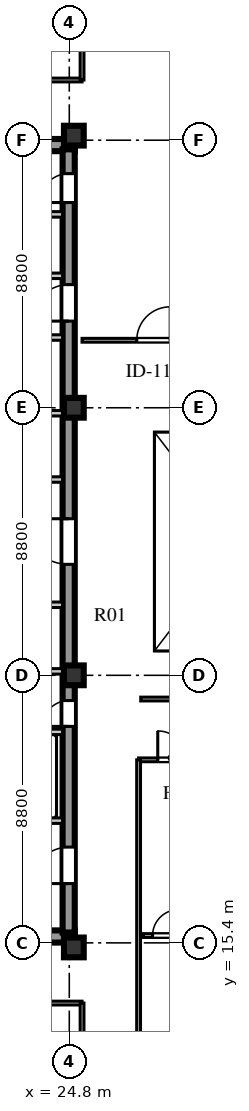
"""IFC4 building model, lengths in metres.
Left out: names, types, materials, properties, quantities, classifications, styles, units other than length and angle.
Written with IfcOpenShell. Run it as: python <this file> out.ifc"""

import sys

from ifc_helpers import new_model, si_unit, direction, frame, frame_2d, origin, origin_2d, place, context, subcontext, project, spatial, rectangle, extrude, element, fill, save


model = new_model("IFC4")
c1 = context("Model", 3, precision=1e-05, world=origin(), true_north=direction((0.0, 1.0)))
c2 = subcontext(c1, "Body", "Model", "MODEL_VIEW")
j1 = project(units=[si_unit("LENGTHUNIT", "METRE"), si_unit("PLANEANGLEUNIT", "RADIAN")], contexts=[c1])
p1 = place(None, origin())
s1 = spatial("IfcSite", under=j1, at=p1, CompositionType="ELEMENT")
p2 = place(p1, origin())
s2 = spatial("IfcBuilding", under=s1, at=p2, CompositionType="ELEMENT")
p3 = place(p2, frame((0.0, 0.0, 272.6)))
s3 = spatial("IfcBuildingStorey", under=s2, at=p3, CompositionType="ELEMENT", Elevation=272.6)
for number, where, z_axis, x_axis in (
    (1, (15.5, 15.61, 0.0), (0.0, 0.0, 1.0), (1.0, 0.0, 0.0)),
    (2, (15.5, 41.64, 0.0), (0.0, 0.0, 1.0), (1.0, 0.0, 0.0)),
):
    element("IfcWall", number, at=place(p3, frame(where, z_axis=z_axis, x_axis=x_axis)), inside=s3, PredefinedType="SHEAR", context=c2, shape_type="SweptSolid", body=[
        extrude(rectangle(XDim=9.48, YDim=0.4, at=frame_2d((4.74, 0.0))), origin(), (0.0, 0.0, 1.0), 3.66),
    ])
p4 = place(p3, frame((24.78, 15.74, 0.0), z_axis=(0.0, 0.0, 1.0), x_axis=(0.0, 1.0, 0.0)))
e3 = element("IfcWall", 3, at=p4, inside=s3, PredefinedType="SHEAR", context=c2, shape_type="SweptSolid", body=[
    extrude(rectangle(XDim=25.76, YDim=0.4, at=frame_2d((12.88, 0.0))), origin(), (0.0, 0.0, 1.0), 3.66),
])
p5 = place(p4, frame((1.61, 0.0, 0.0)))
e4 = element("IfcOpeningElement", 4, at=p5, cuts=e3, PredefinedType="OPENING", context=c2, shape_type="SweptSolid", body=[
    extrude(rectangle(XDim=1.2, YDim=2.1, at=frame_2d((0.6, 1.05))), frame((0.0, 0.21, 0.0), z_axis=(0.0, -1.0, 0.0), x_axis=(1.0, 0.0, 0.0)), (0.0, 0.0, 1.0), 0.42),
])
p6 = place(p4, frame((6.78, 0.0, 0.0)))
e5 = element("IfcOpeningElement", 5, at=p6, cuts=e3, PredefinedType="OPENING", context=c2, shape_type="SweptSolid", body=[
    extrude(rectangle(XDim=0.85, YDim=2.06, at=frame_2d((0.425, 1.03))), frame((0.0, 0.21, 0.0), z_axis=(0.0, -1.0, 0.0), x_axis=(1.0, 0.0, 0.0)), (0.0, 0.0, 1.0), 0.42),
])
p7 = place(p4, frame((12.11, 0.0, 0.0)))
e6 = element("IfcOpeningElement", 6, at=p7, cuts=e3, PredefinedType="OPENING", context=c2, shape_type="SweptSolid", body=[
    extrude(rectangle(XDim=1.5, YDim=2.12, at=frame_2d((0.75, 1.06))), frame((0.0, 0.21, 0.0), z_axis=(0.0, -1.0, 0.0), x_axis=(1.0, 0.0, 0.0)), (0.0, 0.0, 1.0), 0.42),
])
p8 = place(p4, frame((20.11, 0.0, 0.0)))
e7 = element("IfcOpeningElement", 7, at=p8, cuts=e3, PredefinedType="OPENING", context=c2, shape_type="SweptSolid", body=[
    extrude(rectangle(XDim=1.2, YDim=2.12, at=frame_2d((0.6, 1.06))), frame((0.0, 0.21, 0.0), z_axis=(0.0, -1.0, 0.0), x_axis=(1.0, 0.0, 0.0)), (0.0, 0.0, 1.0), 0.42),
])
p9 = place(p4, frame((24.01, 0.0, 0.0)))
e8 = element("IfcOpeningElement", 8, at=p9, cuts=e3, PredefinedType="OPENING", context=c2, shape_type="SweptSolid", body=[
    extrude(rectangle(XDim=0.95, YDim=2.1, at=frame_2d((0.475, 1.05))), frame((0.0, 0.21, 0.0), z_axis=(0.0, -1.0, 0.0), x_axis=(1.0, 0.0, 0.0)), (0.0, 0.0, 1.0), 0.42),
])
for number, where, z_axis, x_axis in (
    (9, (24.95, 15.25, 0.0), (0.0, 0.0, 1.0), (1.0, 0.0, 0.0)),
    (10, (24.95, 24.2, 0.0), (0.0, 0.0, 1.0), (1.0, 0.0, 0.0)),
    (11, (24.95, 33.0, 0.0), (0.0, 0.0, 1.0), (1.0, 0.0, 0.0)),
    (12, (24.95, 41.95, 0.0), (0.0, 0.0, 1.0), (1.0, 0.0, 0.0)),
):
    element("IfcColumn", number, at=place(p3, frame(where, z_axis=z_axis, x_axis=x_axis)), inside=s3, PredefinedType="COLUMN", context=c2, shape_type="SweptSolid", body=[
        extrude(rectangle(XDim=0.65, YDim=0.65, at=origin_2d()), origin(), (0.0, 0.0, 1.0), 3.66),
    ])
p10 = place(p3, frame((19.64, 19.42, 0.0), z_axis=(0.0, 0.0, 1.0), x_axis=(1.0, 0.0, 0.0)))
e13 = element("IfcWall", 13, at=p10, inside=s3, PredefinedType="SOLIDWALL", context=c2, shape_type="SweptSolid", body=[
    extrude(rectangle(XDim=4.94, YDim=0.18, at=frame_2d((2.47, 0.0))), origin(), (0.0, 0.0, 1.0), 3.66),
])
p11 = place(p10, frame((0.72, 0.0, 0.0)))
e14 = element("IfcOpeningElement", 14, at=p11, cuts=e13, PredefinedType="OPENING", context=c2, shape_type="SweptSolid", body=[
    extrude(rectangle(XDim=1.1, YDim=2.1, at=frame_2d((0.55, 1.05))), frame((0.0, 0.1, 0.0), z_axis=(0.0, -1.0, 0.0), x_axis=(1.0, 0.0, 0.0)), (0.0, 0.0, 1.0), 0.2),
])
p12 = place(p10, frame((3.02, 0.0, 0.0)))
e15 = element("IfcOpeningElement", 15, at=p12, cuts=e13, PredefinedType="OPENING", context=c2, shape_type="SweptSolid", body=[
    extrude(rectangle(XDim=1.1, YDim=2.1, at=frame_2d((0.55, 1.05))), frame((0.0, 0.1, 0.0), z_axis=(0.0, -1.0, 0.0), x_axis=(1.0, 0.0, 0.0)), (0.0, 0.0, 1.0), 0.2),
])
p13 = place(p3, frame((19.64, 22.34, 0.0), z_axis=(0.0, 0.0, 1.0), x_axis=(1.0, 0.0, 0.0)))
e16 = element("IfcWall", 16, at=p13, inside=s3, PredefinedType="SOLIDWALL", context=c2, shape_type="SweptSolid", body=[
    extrude(rectangle(XDim=4.94, YDim=0.18, at=frame_2d((2.47, 0.0))), origin(), (0.0, 0.0, 1.0), 3.66),
])
p14 = place(p3, frame((15.9, 26.52, 0.0), z_axis=(0.0, 0.0, 1.0), x_axis=(1.0, 0.0, 0.0)))
e17 = element("IfcWall", 17, at=p14, inside=s3, PredefinedType="SOLIDWALL", context=c2, shape_type="SweptSolid", body=[
    extrude(rectangle(XDim=8.68, YDim=0.18, at=frame_2d((4.34, 0.0))), origin(), (0.0, 0.0, 1.0), 3.66),
])
p15 = place(p14, frame((2.5, 0.0, 0.0)))
e18 = element("IfcOpeningElement", 18, at=p15, cuts=e17, PredefinedType="OPENING", context=c2, shape_type="SweptSolid", body=[
    extrude(rectangle(XDim=0.95, YDim=2.1, at=frame_2d((0.475, 1.05))), frame((0.0, 0.1, 0.0), z_axis=(0.0, -1.0, 0.0), x_axis=(1.0, 0.0, 0.0)), (0.0, 0.0, 1.0), 0.2),
])
p16 = place(p14, frame((6.0, 0.0, 0.0)))
e19 = element("IfcOpeningElement", 19, at=p16, cuts=e17, PredefinedType="OPENING", context=c2, shape_type="SweptSolid", body=[
    extrude(rectangle(XDim=0.95, YDim=2.1, at=frame_2d((0.475, 1.05))), frame((0.0, 0.1, 0.0), z_axis=(0.0, -1.0, 0.0), x_axis=(1.0, 0.0, 0.0)), (0.0, 0.0, 1.0), 0.2),
])
p17 = place(p3, frame((15.9, 24.33, 0.0), z_axis=(0.0, 0.0, 1.0), x_axis=(1.0, 0.0, 0.0)))
e20 = element("IfcWall", 20, at=p17, inside=s3, PredefinedType="SOLIDWALL", context=c2, shape_type="SweptSolid", body=[
    extrude(rectangle(XDim=8.68, YDim=0.18, at=frame_2d((4.34, 0.0))), origin(), (0.0, 0.0, 1.0), 3.06),
])
p18 = place(p3, frame((15.9, 30.64, 0.0), z_axis=(0.0, 0.0, 1.0), x_axis=(1.0, 0.0, 0.0)))
e21 = element("IfcWall", 21, at=p18, inside=s3, PredefinedType="SOLIDWALL", context=c2, shape_type="SweptSolid", body=[
    extrude(rectangle(XDim=8.68, YDim=0.18, at=frame_2d((4.34, 0.0))), origin(), (0.0, 0.0, 1.0), 3.66),
])
p19 = place(p18, frame((3.7, 0.0, 0.0)))
e22 = element("IfcOpeningElement", 22, at=p19, cuts=e21, PredefinedType="OPENING", context=c2, shape_type="SweptSolid", body=[
    extrude(rectangle(XDim=0.95, YDim=2.1, at=frame_2d((0.475, 1.05))), frame((0.0, 0.1, 0.0), z_axis=(0.0, -1.0, 0.0), x_axis=(1.0, 0.0, 0.0)), (0.0, 0.0, 1.0), 0.2),
])
p20 = place(p3, frame((15.9, 32.82, 0.0), z_axis=(0.0, 0.0, 1.0), x_axis=(1.0, 0.0, 0.0)))
e23 = element("IfcWall", 23, at=p20, inside=s3, PredefinedType="SOLIDWALL", context=c2, shape_type="SweptSolid", body=[
    extrude(rectangle(XDim=8.68, YDim=0.18, at=frame_2d((4.34, 0.0))), origin(), (0.0, 0.0, 1.0), 3.06),
])
p21 = place(p3, frame((22.02, 35.31, 0.0), z_axis=(0.0, 0.0, 1.0), x_axis=(1.0, 0.0, 0.0)))
e24 = element("IfcWall", 24, at=p21, inside=s3, PredefinedType="SOLIDWALL", context=c2, shape_type="SweptSolid", body=[
    extrude(rectangle(XDim=2.56, YDim=0.18, at=frame_2d((1.28, 0.0))), origin(), (0.0, 0.0, 1.0), 3.66),
])
p22 = place(p21, frame((0.55, 0.0, 0.0)))
e25 = element("IfcOpeningElement", 25, at=p22, cuts=e24, PredefinedType="OPENING", context=c2, shape_type="SweptSolid", body=[
    extrude(rectangle(XDim=1.0, YDim=2.1, at=frame_2d((0.5, 1.05))), frame((0.0, 0.1, 0.0), z_axis=(0.0, -1.0, 0.0), x_axis=(1.0, 0.0, 0.0)), (0.0, 0.0, 1.0), 0.2),
])
p23 = place(p3, frame((19.64, 37.34, 0.0), z_axis=(0.0, 0.0, 1.0), x_axis=(1.0, 0.0, 0.0)))
e26 = element("IfcWall", 26, at=p23, inside=s3, PredefinedType="SOLIDWALL", context=c2, shape_type="SweptSolid", body=[
    extrude(rectangle(XDim=4.94, YDim=0.18, at=frame_2d((2.47, 0.0))), origin(), (0.0, 0.0, 1.0), 3.66),
])
p24 = place(p23, frame((0.45, 0.0, 0.0)))
e27 = element("IfcOpeningElement", 27, at=p24, cuts=e26, PredefinedType="OPENING", context=c2, shape_type="SweptSolid", body=[
    extrude(rectangle(XDim=1.0, YDim=2.1, at=frame_2d((0.5, 1.05))), frame((0.0, 0.1, 0.0), z_axis=(0.0, -1.0, 0.0), x_axis=(1.0, 0.0, 0.0)), (0.0, 0.0, 1.0), 0.2),
])
p25 = place(p23, frame((2.5, 0.0, 0.0)))
e28 = element("IfcOpeningElement", 28, at=p25, cuts=e26, PredefinedType="OPENING", context=c2, shape_type="SweptSolid", body=[
    extrude(rectangle(XDim=1.0, YDim=2.1, at=frame_2d((0.5, 1.05))), frame((0.0, 0.1, 0.0), z_axis=(0.0, -1.0, 0.0), x_axis=(1.0, 0.0, 0.0)), (0.0, 0.0, 1.0), 0.2),
])
p26 = place(p3, frame((19.64, 39.36, 0.0), z_axis=(0.0, 0.0, 1.0), x_axis=(1.0, 0.0, 0.0)))
e29 = element("IfcWall", 29, at=p26, inside=s3, PredefinedType="SOLIDWALL", context=c2, shape_type="SweptSolid", body=[
    extrude(rectangle(XDim=4.94, YDim=0.18, at=frame_2d((2.47, 0.0))), origin(), (0.0, 0.0, 1.0), 3.66),
])
p27 = place(p3, frame((27.08, 21.42, 0.0), z_axis=(0.0, 0.0, 1.0), x_axis=(1.0, 0.0, 0.0)))
e30 = element("IfcWall", 30, at=p27, inside=s3, PredefinedType="PLUMBINGWALL", context=c2, shape_type="SweptSolid", body=[
    extrude(rectangle(XDim=12.07, YDim=0.125, at=frame_2d((6.035, 0.0))), origin(), (0.0, 0.0, 1.0), 3.36),
])
p28 = place(p27, frame((0.63, 0.0, 0.0)))
e31 = element("IfcOpeningElement", 31, at=p28, cuts=e30, PredefinedType="OPENING", context=c2, shape_type="SweptSolid", body=[
    extrude(rectangle(XDim=0.95, YDim=2.1, at=frame_2d((0.475, 1.05))), frame((0.0, 0.073, 0.0), z_axis=(0.0, -1.0, 0.0), x_axis=(1.0, 0.0, 0.0)), (0.0, 0.0, 1.0), 0.145),
])
p29 = place(p3, frame((27.08, 10.38, 0.0), z_axis=(0.0, 0.0, 1.0), x_axis=(0.0, 1.0, 0.0)))
e32 = element("IfcWall", 32, at=p29, inside=s3, PredefinedType="PLUMBINGWALL", context=c2, shape_type="SweptSolid", body=[
    extrude(rectangle(XDim=11.04, YDim=0.125, at=frame_2d((5.52, 0.0))), origin(), (0.0, 0.0, 1.0), 3.66),
])
p30 = place(p3, frame((27.15, 23.42, 0.0), z_axis=(0.0, 0.0, 1.0), x_axis=(1.0, 0.0, 0.0)))
e33 = element("IfcWall", 33, at=p30, inside=s3, PredefinedType="PLUMBINGWALL", context=c2, shape_type="SweptSolid", body=[
    extrude(rectangle(XDim=6.0, YDim=0.125, at=frame_2d((3.0, 0.0))), origin(), (0.0, 0.0, 1.0), 3.66),
])
p31 = place(p3, frame((25.22, 35.22, 0.0), z_axis=(0.0, 0.0, 1.0), x_axis=(1.0, 0.0, 0.0)))
e34 = element("IfcWall", 34, at=p31, inside=s3, PredefinedType="PLUMBINGWALL", context=c2, shape_type="SweptSolid", body=[
    extrude(rectangle(XDim=9.5, YDim=0.125, at=frame_2d((4.75, 0.0))), origin(), (0.0, 0.0, 1.0), 3.66),
])
p32 = place(p31, frame((1.8, 0.0, 0.0)))
e35 = element("IfcOpeningElement", 35, at=p32, cuts=e34, PredefinedType="OPENING", context=c2, shape_type="SweptSolid", body=[
    extrude(rectangle(XDim=1.1, YDim=2.08, at=frame_2d((0.55, 1.04))), frame((0.0, 0.073, 0.0), z_axis=(0.0, -1.0, 0.0), x_axis=(1.0, 0.0, 0.0)), (0.0, 0.0, 1.0), 0.145),
])
p33 = place(p3, frame((13.8, 13.42, 0.0), z_axis=(0.0, 0.0, 1.0), x_axis=(1.0, 0.0, 0.0)))
e36 = element("IfcWall", 36, at=p33, inside=s3, PredefinedType="PLUMBINGWALL", context=c2, shape_type="SweptSolid", body=[
    extrude(rectangle(XDim=11.42, YDim=0.125, at=frame_2d((5.71, 0.0))), origin(), (0.0, 0.0, 1.0), 3.66),
])
p34 = place(p33, frame((3.2, 0.0, 0.0)))
e37 = element("IfcOpeningElement", 37, at=p34, cuts=e36, PredefinedType="OPENING", context=c2, shape_type="SweptSolid", body=[
    extrude(rectangle(XDim=0.95, YDim=2.08, at=frame_2d((0.475, 1.04))), frame((0.0, 0.073, 0.0), z_axis=(0.0, -1.0, 0.0), x_axis=(1.0, 0.0, 0.0)), (0.0, 0.0, 1.0), 0.145),
])
p35 = place(p3, frame((25.22, 10.38, 0.0), z_axis=(0.0, 0.0, 1.0), x_axis=(0.0, 1.0, 0.0)))
e38 = element("IfcWall", 38, at=p35, inside=s3, PredefinedType="PLUMBINGWALL", context=c2, shape_type="SweptSolid", body=[
    extrude(rectangle(XDim=3.04, YDim=0.125, at=frame_2d((1.52, 0.0))), origin(), (0.0, 0.0, 1.0), 3.21),
])
p36 = place(p3, frame((13.8, 43.78, 0.0), z_axis=(0.0, 0.0, 1.0), x_axis=(1.0, 0.0, 0.0)))
e39 = element("IfcWall", 39, at=p36, inside=s3, PredefinedType="PLUMBINGWALL", context=c2, shape_type="SweptSolid", body=[
    extrude(rectangle(XDim=11.42, YDim=0.125, at=frame_2d((5.71, 0.0))), origin(), (0.0, 0.0, 1.0), 3.66),
])
p37 = place(p36, frame((3.2, 0.0, 0.0)))
e40 = element("IfcOpeningElement", 40, at=p37, cuts=e39, PredefinedType="OPENING", context=c2, shape_type="SweptSolid", body=[
    extrude(rectangle(XDim=0.95, YDim=2.08, at=frame_2d((0.475, 1.04))), frame((0.0, 0.073, 0.0), z_axis=(0.0, -1.0, 0.0), x_axis=(1.0, 0.0, 0.0)), (0.0, 0.0, 1.0), 0.145),
])
p38 = place(p3, frame((25.22, 43.78, 0.0), z_axis=(0.0, 0.0, 1.0), x_axis=(0.0, 1.0, 0.0)))
e41 = element("IfcWall", 41, at=p38, inside=s3, PredefinedType="PLUMBINGWALL", context=c2, shape_type="SweptSolid", body=[
    extrude(rectangle(XDim=3.04, YDim=0.125, at=frame_2d((1.52, 0.0))), origin(), (0.0, 0.0, 1.0), 3.21),
])
p39 = place(p3, frame((27.24, 15.641, 0.0), z_axis=(0.0, 0.0, 1.0), x_axis=(1.0, 0.0, 0.0)))
e42 = element("IfcWall", 42, at=p39, inside=s3, PredefinedType="PLUMBINGWALL", context=c2, shape_type="SweptSolid", body=[
    extrude(rectangle(XDim=11.83, YDim=0.125, at=frame_2d((5.915, 0.0))), origin(), (0.0, 0.0, 1.0), 3.66),
])
p40 = place(p39, frame((0.3, 0.0, 0.0)))
e43 = element("IfcOpeningElement", 43, at=p40, cuts=e42, PredefinedType="OPENING", context=c2, shape_type="SweptSolid", body=[
    extrude(rectangle(XDim=0.85, YDim=2.08, at=frame_2d((0.425, 1.04))), frame((0.0, 0.073, 0.0), z_axis=(0.0, -1.0, 0.0), x_axis=(1.0, 0.0, 0.0)), (0.0, 0.0, 1.0), 0.145),
])
p41 = place(p39, frame((4.475, 0.0, 0.0)))
e44 = element("IfcOpeningElement", 44, at=p41, cuts=e42, PredefinedType="OPENING", context=c2, shape_type="SweptSolid", body=[
    extrude(rectangle(XDim=0.85, YDim=2.08, at=frame_2d((0.425, 1.04))), frame((0.0, 0.073, 0.0), z_axis=(0.0, -1.0, 0.0), x_axis=(1.0, 0.0, 0.0)), (0.0, 0.0, 1.0), 0.145),
])
p42 = place(p5, frame((1.2, 0.0, 0.0), z_axis=(0.0, 0.0, 1.0), x_axis=(-1.0, 0.0, 0.0)))
e45 = element("IfcDoor", 45, at=p42, inside=s3, OperationType="SINGLE_SWING_RIGHT", PredefinedType="DOOR", context=c2, shape_type="SweptSolid", body=[
    extrude(rectangle(XDim=1.2, YDim=2.1, at=frame_2d((0.6, 1.05))), frame((0.0, 0.025, 0.0), z_axis=(0.0, -1.0, 0.0), x_axis=(1.0, 0.0, 0.0)), (0.0, 0.0, 1.0), 0.05),
])
fill(e4, e45)
p43 = place(p6, frame((0.85, 0.0, 0.0), z_axis=(0.0, 0.0, 1.0), x_axis=(-1.0, 0.0, 0.0)))
e46 = element("IfcDoor", 46, at=p43, inside=s3, OperationType="SINGLE_SWING_RIGHT", PredefinedType="DOOR", context=c2, shape_type="SweptSolid", body=[
    extrude(rectangle(XDim=0.85, YDim=2.06, at=frame_2d((0.425, 1.03))), frame((0.0, 0.025, 0.0), z_axis=(0.0, -1.0, 0.0), x_axis=(1.0, 0.0, 0.0)), (0.0, 0.0, 1.0), 0.05),
])
fill(e5, e46)
p44 = place(p7, frame((1.5, 0.0, 0.0), z_axis=(0.0, 0.0, 1.0), x_axis=(-1.0, 0.0, 0.0)))
e47 = element("IfcDoor", 47, at=p44, inside=s3, OperationType="SINGLE_SWING_LEFT", PredefinedType="DOOR", context=c2, shape_type="SweptSolid", body=[
    extrude(rectangle(XDim=1.5, YDim=2.12, at=frame_2d((0.75, 1.06))), frame((0.0, 0.025, 0.0), z_axis=(0.0, -1.0, 0.0), x_axis=(1.0, 0.0, 0.0)), (0.0, 0.0, 1.0), 0.05),
])
fill(e6, e47)
p45 = place(p8, frame((1.2, 0.0, 0.0), z_axis=(0.0, 0.0, 1.0), x_axis=(-1.0, 0.0, 0.0)))
e48 = element("IfcDoor", 48, at=p45, inside=s3, OperationType="SINGLE_SWING_RIGHT", PredefinedType="DOOR", context=c2, shape_type="SweptSolid", body=[
    extrude(rectangle(XDim=1.2, YDim=2.12, at=frame_2d((0.6, 1.06))), frame((0.0, 0.025, 0.0), z_axis=(0.0, -1.0, 0.0), x_axis=(1.0, 0.0, 0.0)), (0.0, 0.0, 1.0), 0.05),
])
fill(e7, e48)
p46 = place(p9, frame((0.95, 0.0, 0.0), z_axis=(0.0, 0.0, 1.0), x_axis=(-1.0, 0.0, 0.0)))
e49 = element("IfcDoor", 49, at=p46, inside=s3, OperationType="SINGLE_SWING_RIGHT", PredefinedType="DOOR", context=c2, shape_type="SweptSolid", body=[
    extrude(rectangle(XDim=0.95, YDim=2.1, at=frame_2d((0.475, 1.05))), frame((0.0, 0.025, 0.0), z_axis=(0.0, -1.0, 0.0), x_axis=(1.0, 0.0, 0.0)), (0.0, 0.0, 1.0), 0.05),
])
fill(e8, e49)
p47 = place(p40, frame((0.85, 0.0, 0.0), z_axis=(0.0, 0.0, 1.0), x_axis=(-1.0, 0.0, 0.0)))
e50 = element("IfcDoor", 50, at=p47, inside=s3, OperationType="SINGLE_SWING_LEFT", PredefinedType="DOOR", context=c2, shape_type="SweptSolid", body=[
    extrude(rectangle(XDim=0.85, YDim=2.08, at=frame_2d((0.425, 1.04))), frame((0.0, 0.025, 0.0), z_axis=(0.0, -1.0, 0.0), x_axis=(1.0, 0.0, 0.0)), (0.0, 0.0, 1.0), 0.05),
])
fill(e43, e50)
p48 = place(p28, frame((0.95, 0.0, 0.0), z_axis=(0.0, 0.0, 1.0), x_axis=(-1.0, 0.0, 0.0)))
e51 = element("IfcDoor", 51, at=p48, inside=s3, OperationType="SINGLE_SWING_RIGHT", PredefinedType="DOOR", context=c2, shape_type="SweptSolid", body=[
    extrude(rectangle(XDim=0.95, YDim=2.1, at=frame_2d((0.475, 1.05))), frame((0.0, 0.025, 0.0), z_axis=(0.0, -1.0, 0.0), x_axis=(1.0, 0.0, 0.0)), (0.0, 0.0, 1.0), 0.05),
])
fill(e31, e51)
p49 = place(p32, origin())
e52 = element("IfcDoor", 52, at=p49, inside=s3, OperationType="SINGLE_SWING_RIGHT", PredefinedType="DOOR", context=c2, shape_type="SweptSolid", body=[
    extrude(rectangle(XDim=1.1, YDim=2.08, at=frame_2d((0.55, 1.04))), frame((0.0, 0.025, 0.0), z_axis=(0.0, -1.0, 0.0), x_axis=(1.0, 0.0, 0.0)), (0.0, 0.0, 1.0), 0.05),
])
fill(e35, e52)
save(model, sys.argv[1])
